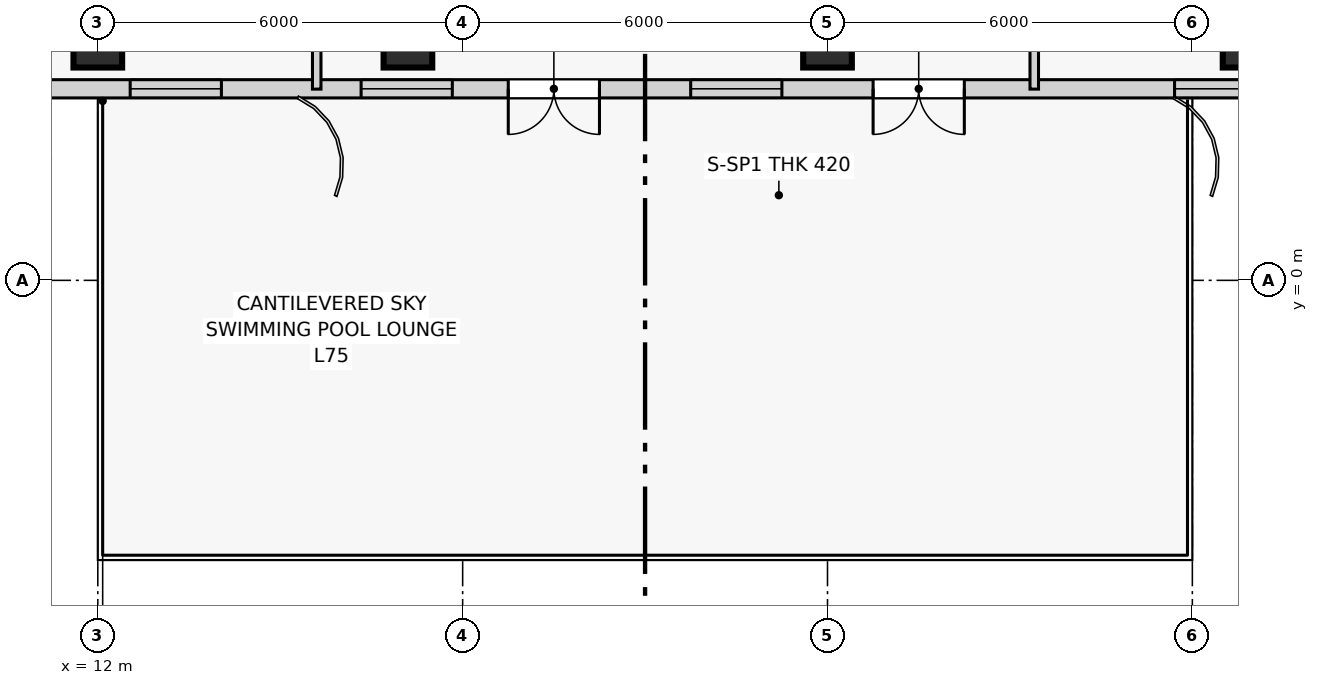
"""IFC4 building model, lengths in metres.
Left out: names, types, materials, properties, quantities, classifications, styles, units other than length and angle.
Written with IfcOpenShell. Run it as: python <this file> out.ifc"""

import sys

from ifc_helpers import new_model, si_unit, direction, frame, frame_2d, origin, origin_2d, place, context, subcontext, project, spatial, rectangle, extrude, source, transform, mapped, element, fill, save


model = new_model("IFC4")
c1 = context("Model", 3, precision=1e-05, world=origin(), true_north=direction((0.0, 1.0)))
c2 = subcontext(c1, "Body", "Model", "MODEL_VIEW")
j1 = project(units=[si_unit("LENGTHUNIT", "METRE"), si_unit("PLANEANGLEUNIT", "RADIAN")], contexts=[c1])
p1 = place(None, origin())
s1 = spatial("IfcSite", under=j1, at=p1, CompositionType="ELEMENT")
p2 = place(p1, origin())
s2 = spatial("IfcBuilding", under=s1, at=p2, CompositionType="ELEMENT")
p3 = place(p2, frame((0.0, 0.0, 285.3)))
s3 = spatial("IfcBuildingStorey", under=s2, at=p3, CompositionType="ELEMENT", Elevation=285.3)
m1 = source(origin(), c2, "Body", "SweptSolid", [
    extrude(rectangle(XDim=0.8, YDim=0.8, at=origin_2d()), origin(), (0.0, 0.0, 1.0), 4.2),
])
for number, where, z_axis, x_axis in (
    (1, (12.0, 3.9, 0.0), (0.0, 0.0, 1.0), (1.0, 0.0, 0.0)),
    (2, (17.1, 3.9, 0.0), (0.0, 0.0, 1.0), (1.0, 0.0, 0.0)),
    (3, (24.0, 3.9, 0.0), (0.0, 0.0, 1.0), (1.0, 0.0, 0.0)),
    (4, (30.9, 3.9, 0.0), (0.0, 0.0, 1.0), (1.0, 0.0, 0.0)),
):
    element("IfcColumn", number, at=place(p3, frame(where, z_axis=z_axis, x_axis=x_axis)), inside=s3, PredefinedType="COLUMN", context=c2, shape_type="MappedRepresentation", body=[
        mapped(m1, transform((0.0, 0.0, 0.0), scale=1.0)),
    ])
p4 = place(p3, frame((6.75, 3.15, 0.0), z_axis=(0.0, 0.0, 1.0), x_axis=(1.0, 0.0, 0.0)))
e5 = element("IfcWall", 5, at=p4, inside=s3, PredefinedType="SOLIDWALL", context=c2, shape_type="SweptSolid", body=[
    extrude(rectangle(XDim=31.5, YDim=0.3, at=frame_2d((15.75, 0.0))), origin(), (0.0, 0.0, 1.0), 3.92),
])
p5 = place(p4, frame((1.667, 0.0, 0.85)))
e6 = element("IfcOpeningElement", 6, at=p5, cuts=e5, PredefinedType="OPENING", context=c2, shape_type="SweptSolid", body=[
    extrude(rectangle(XDim=1.5, YDim=1.8, at=frame_2d((0.75, 0.9))), frame((0.0, 0.16, 0.0), z_axis=(0.0, -1.0, 0.0), x_axis=(1.0, 0.0, 0.0)), (0.0, 0.0, 1.0), 0.32),
])
p6 = place(p4, frame((5.782, 0.0, 0.85)))
e7 = element("IfcOpeningElement", 7, at=p6, cuts=e5, PredefinedType="OPENING", context=c2, shape_type="SweptSolid", body=[
    extrude(rectangle(XDim=1.5, YDim=1.8, at=frame_2d((0.75, 0.9))), frame((0.0, 0.16, 0.0), z_axis=(0.0, -1.0, 0.0), x_axis=(1.0, 0.0, 0.0)), (0.0, 0.0, 1.0), 0.32),
])
p7 = place(p4, frame((9.58, 0.0, 0.85)))
e8 = element("IfcOpeningElement", 8, at=p7, cuts=e5, PredefinedType="OPENING", context=c2, shape_type="SweptSolid", body=[
    extrude(rectangle(XDim=1.5, YDim=1.8, at=frame_2d((0.75, 0.9))), frame((0.0, 0.16, 0.0), z_axis=(0.0, -1.0, 0.0), x_axis=(1.0, 0.0, 0.0)), (0.0, 0.0, 1.0), 0.32),
])
p8 = place(p4, frame((15.0, 0.0, 0.85)))
e9 = element("IfcOpeningElement", 9, at=p8, cuts=e5, PredefinedType="OPENING", context=c2, shape_type="SweptSolid", body=[
    extrude(rectangle(XDim=1.5, YDim=1.8, at=frame_2d((0.75, 0.9))), frame((0.0, 0.16, 0.0), z_axis=(0.0, -1.0, 0.0), x_axis=(1.0, 0.0, 0.0)), (0.0, 0.0, 1.0), 0.32),
])
p9 = place(p4, frame((22.958, 0.0, 0.85)))
e10 = element("IfcOpeningElement", 10, at=p9, cuts=e5, PredefinedType="OPENING", context=c2, shape_type="SweptSolid", body=[
    extrude(rectangle(XDim=1.5, YDim=1.8, at=frame_2d((0.75, 0.9))), frame((0.0, 0.16, 0.0), z_axis=(0.0, -1.0, 0.0), x_axis=(1.0, 0.0, 0.0)), (0.0, 0.0, 1.0), 0.32),
])
p10 = place(p4, frame((28.333, 0.0, 0.85)))
e11 = element("IfcOpeningElement", 11, at=p10, cuts=e5, PredefinedType="OPENING", context=c2, shape_type="SweptSolid", body=[
    extrude(rectangle(XDim=1.5, YDim=1.8, at=frame_2d((0.75, 0.9))), frame((0.0, 0.16, 0.0), z_axis=(0.0, -1.0, 0.0), x_axis=(1.0, 0.0, 0.0)), (0.0, 0.0, 1.0), 0.32),
])
p11 = place(p4, frame((12.0, 0.0, 0.0)))
e12 = element("IfcOpeningElement", 12, at=p11, cuts=e5, PredefinedType="OPENING", context=c2, shape_type="SweptSolid", body=[
    extrude(rectangle(XDim=1.5, YDim=2.3, at=frame_2d((0.75, 1.15))), frame((0.0, 0.16, 0.0), z_axis=(0.0, -1.0, 0.0), x_axis=(1.0, 0.0, 0.0)), (0.0, 0.0, 1.0), 0.32),
])
p12 = place(p4, frame((18.0, 0.0, 0.0)))
e13 = element("IfcOpeningElement", 13, at=p12, cuts=e5, PredefinedType="OPENING", context=c2, shape_type="SweptSolid", body=[
    extrude(rectangle(XDim=1.5, YDim=2.3, at=frame_2d((0.75, 1.15))), frame((0.0, 0.16, 0.0), z_axis=(0.0, -1.0, 0.0), x_axis=(1.0, 0.0, 0.0)), (0.0, 0.0, 1.0), 0.32),
])
for number, where, z_axis, x_axis in (
    (14, (15.6, 3.145, 0.0), (0.0, 0.0, 1.0), (0.0, 1.0, 0.0)),
    (15, (27.4, 3.145, 0.0), (0.0, 0.0, 1.0), (0.0, 1.0, 0.0)),
):
    element("IfcWall", number, at=place(p3, frame(where, z_axis=z_axis, x_axis=x_axis)), inside=s3, PredefinedType="PARTITIONING", context=c2, shape_type="SweptSolid", body=[
        extrude(rectangle(XDim=6.528, YDim=0.14, at=frame_2d((3.264, 0.0))), origin(), (0.0, 0.0, 1.0), 3.92),
    ])
m2 = source(origin(), c2, "Body", "SweptSolid", [
    extrude(rectangle(XDim=1.5, YDim=1.8, at=frame_2d((0.75, 0.9))), frame((0.0, 0.03, 0.0), z_axis=(0.0, -1.0, 0.0), x_axis=(1.0, 0.0, 0.0)), (0.0, 0.0, 1.0), 0.06),
])
p13 = place(p6, origin())
e16 = element("IfcWindow", 16, at=p13, inside=s3, PartitioningType="SINGLE_PANEL", PredefinedType="WINDOW", context=c2, shape_type="MappedRepresentation", body=[
    mapped(m2, transform((0.0, 0.0, 0.0), scale=1.0)),
])
fill(e7, e16)
p14 = place(p7, origin())
e17 = element("IfcWindow", 17, at=p14, inside=s3, PartitioningType="SINGLE_PANEL", PredefinedType="WINDOW", context=c2, shape_type="MappedRepresentation", body=[
    mapped(m2, transform((0.0, 0.0, 0.0), scale=1.0)),
])
fill(e8, e17)
p15 = place(p8, origin())
e18 = element("IfcWindow", 18, at=p15, inside=s3, PartitioningType="SINGLE_PANEL", PredefinedType="WINDOW", context=c2, shape_type="MappedRepresentation", body=[
    mapped(m2, transform((0.0, 0.0, 0.0), scale=1.0)),
])
fill(e9, e18)
p16 = place(p9, origin())
e19 = element("IfcWindow", 19, at=p16, inside=s3, PartitioningType="SINGLE_PANEL", PredefinedType="WINDOW", context=c2, shape_type="MappedRepresentation", body=[
    mapped(m2, transform((0.0, 0.0, 0.0), scale=1.0)),
])
fill(e10, e19)
m3 = source(origin(), c2, "Body", "SweptSolid", [
    extrude(rectangle(XDim=1.5, YDim=2.3, at=frame_2d((0.75, 1.15))), frame((0.0, 0.025, 0.0), z_axis=(0.0, -1.0, 0.0), x_axis=(1.0, 0.0, 0.0)), (0.0, 0.0, 1.0), 0.05),
])
p17 = place(p11, frame((1.5, 0.0, 0.0), z_axis=(0.0, 0.0, 1.0), x_axis=(-1.0, 0.0, 0.0)))
e20 = element("IfcDoor", 20, at=p17, inside=s3, OperationType="DOUBLE_DOOR_SINGLE_SWING", PredefinedType="DOOR", context=c2, shape_type="MappedRepresentation", body=[
    mapped(m3, transform((0.0, 0.0, 0.0), scale=1.0)),
])
fill(e12, e20)
p18 = place(p12, frame((1.5, 0.0, 0.0), z_axis=(0.0, 0.0, 1.0), x_axis=(-1.0, 0.0, 0.0)))
e21 = element("IfcDoor", 21, at=p18, inside=s3, OperationType="DOUBLE_DOOR_SINGLE_SWING", PredefinedType="DOOR", context=c2, shape_type="MappedRepresentation", body=[
    mapped(m3, transform((0.0, 0.0, 0.0), scale=1.0)),
])
fill(e13, e21)
save(model, sys.argv[1])
